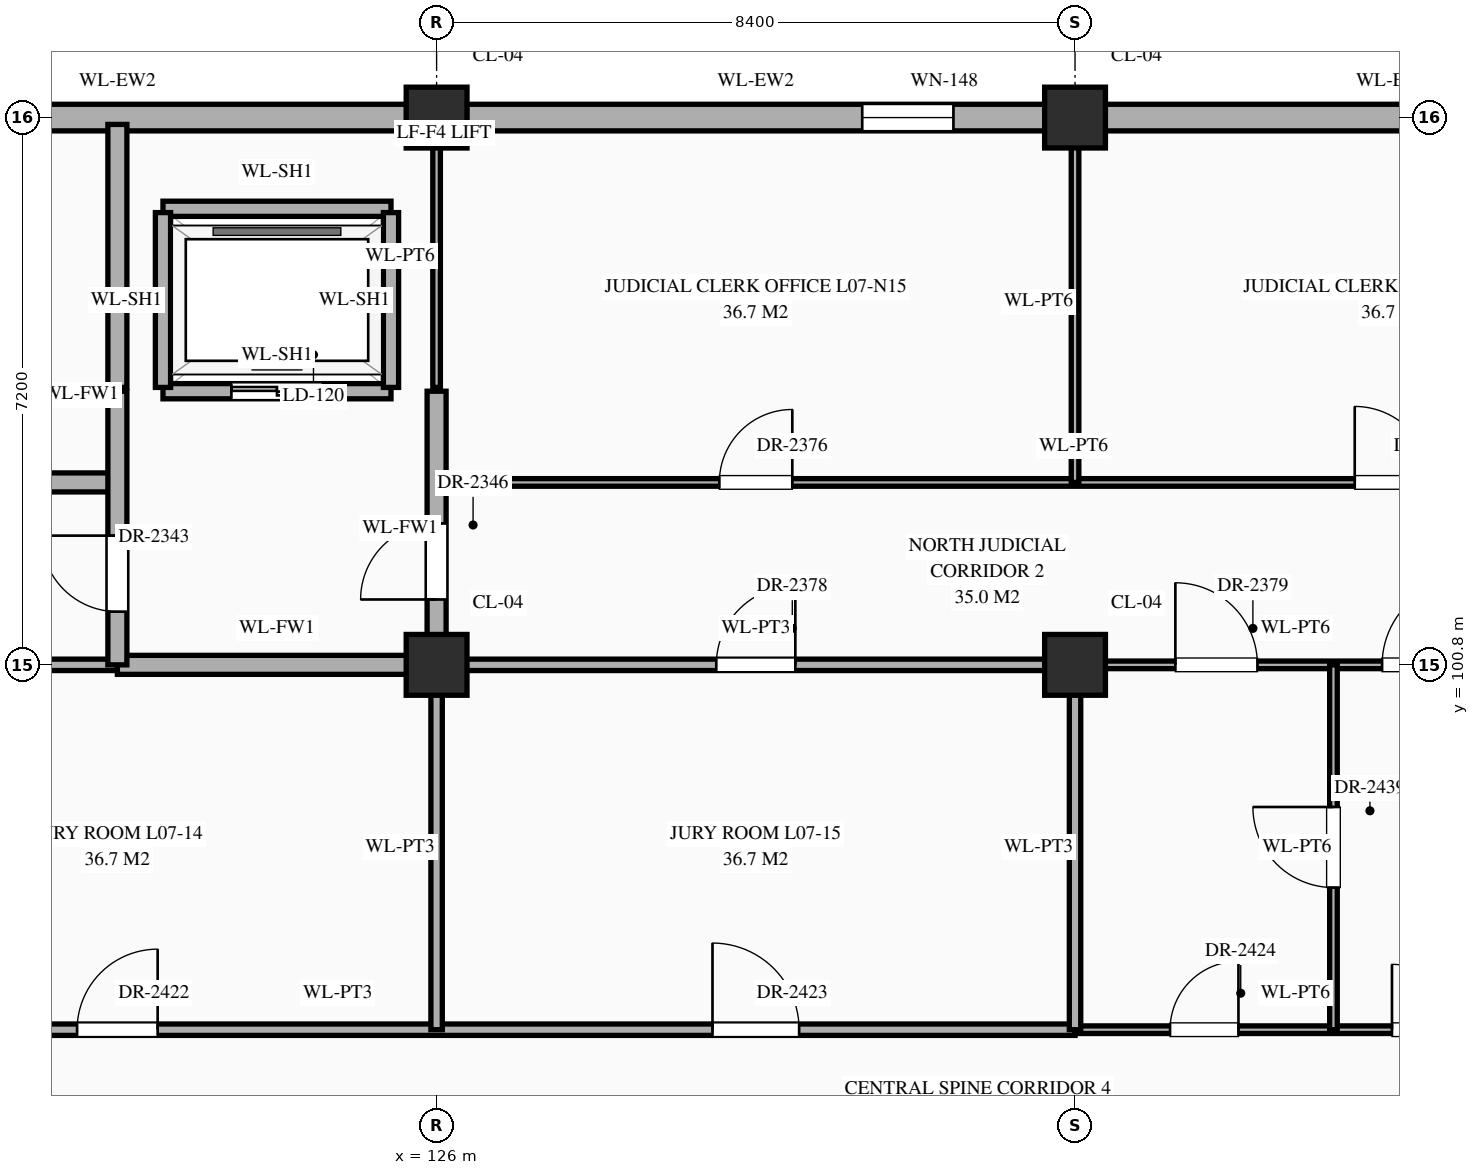
"""IFC4 building model, lengths in metres.
Left out: names, types, materials, properties, quantities, classifications, styles, units other than length and angle.
Written with IfcOpenShell. Run it as: python <this file> out.ifc"""

import sys

from ifc_helpers import new_model, si_unit, direction, frame, frame_2d, origin, origin_2d, place, context, subcontext, project, spatial, rectangle, extrude, element, fill, save


model = new_model("IFC4")
c1 = context("Model", 3, precision=1e-05, world=origin(), true_north=direction((0.0, 1.0)))
c2 = subcontext(c1, "Body", "Model", "MODEL_VIEW")
j1 = project(units=[si_unit("LENGTHUNIT", "METRE"), si_unit("PLANEANGLEUNIT", "RADIAN")], contexts=[c1])
p1 = place(None, origin())
s1 = spatial("IfcSite", under=j1, at=p1, CompositionType="ELEMENT")
p2 = place(p1, origin())
s2 = spatial("IfcBuilding", under=s1, at=p2, CompositionType="ELEMENT")
p3 = place(p2, frame((0.0, 0.0, 30.6)))
s3 = spatial("IfcBuildingStorey", under=s2, at=p3, CompositionType="ELEMENT", Elevation=30.6)
for number, where, z_axis, x_axis in (
    (1, (126.0, 100.8, 0.0), (0.0, 0.0, 1.0), (1.0, 0.0, 0.0)),
    (2, (126.0, 108.0, 0.0), (0.0, 0.0, 1.0), (1.0, 0.0, 0.0)),
    (3, (134.4, 100.8, 0.0), (0.0, 0.0, 1.0), (1.0, 0.0, 0.0)),
    (4, (134.4, 108.0, 0.0), (0.0, 0.0, 1.0), (1.0, 0.0, 0.0)),
):
    element("IfcColumn", number, at=place(p3, frame(where, z_axis=z_axis, x_axis=x_axis)), inside=s3, PredefinedType="COLUMN", context=c2, shape_type="SweptSolid", body=[
        extrude(rectangle(XDim=0.8, YDim=0.8, at=origin_2d()), origin(), (0.0, 0.0, 1.0), 4.5),
    ])
p4 = place(p3, frame((117.995, 108.0, 0.0), z_axis=(0.0, 0.0, 1.0), x_axis=(1.0, 0.0, 0.0)))
e5 = element("IfcWall", 5, at=p4, inside=s3, PredefinedType="STANDARD", context=c2, shape_type="SweptSolid", body=[
    extrude(rectangle(XDim=7.61, YDim=0.35, at=frame_2d((3.805, 0.0))), origin(), (0.0, 0.0, 1.0), 3.59),
])
p5 = place(p3, frame((126.395, 108.0, 0.0), z_axis=(0.0, 0.0, 1.0), x_axis=(1.0, 0.0, 0.0)))
e6 = element("IfcWall", 6, at=p5, inside=s3, PredefinedType="STANDARD", context=c2, shape_type="SweptSolid", body=[
    extrude(rectangle(XDim=7.61, YDim=0.35, at=frame_2d((3.805, 0.0))), origin(), (0.0, 0.0, 1.0), 3.5),
])
p6 = place(p5, frame((5.205, 0.0, 0.85)))
e7 = element("IfcOpeningElement", 7, at=p6, cuts=e6, PredefinedType="OPENING", context=c2, shape_type="SweptSolid", body=[
    extrude(rectangle(XDim=1.2, YDim=1.56, at=frame_2d((0.6, 0.78))), frame((0.0, 0.187, 0.0), z_axis=(0.0, -1.0, 0.0), x_axis=(1.0, 0.0, 0.0)), (0.0, 0.0, 1.0), 0.374),
])
p7 = place(p3, frame((134.795, 108.0, 0.0), z_axis=(0.0, 0.0, 1.0), x_axis=(1.0, 0.0, 0.0)))
e8 = element("IfcWall", 8, at=p7, inside=s3, PredefinedType="STANDARD", context=c2, shape_type="SweptSolid", body=[
    extrude(rectangle(XDim=7.61, YDim=0.35, at=frame_2d((3.805, 0.0))), origin(), (0.0, 0.0, 1.0), 3.65),
])
p8 = place(p7, frame((5.205, 0.0, 0.85)))
e9 = element("IfcOpeningElement", 9, at=p8, cuts=e8, PredefinedType="OPENING", context=c2, shape_type="SweptSolid", body=[
    extrude(rectangle(XDim=1.2, YDim=1.74, at=frame_2d((0.6, 0.87))), frame((0.0, 0.187, 0.0), z_axis=(0.0, -1.0, 0.0), x_axis=(1.0, 0.0, 0.0)), (0.0, 0.0, 1.0), 0.374),
])
p9 = place(p3, frame((115.0, 96.0, 0.0), z_axis=(0.0, 0.0, 1.0), x_axis=(1.0, 0.0, 0.0)))
e10 = element("IfcWall", 10, at=p9, inside=s3, PredefinedType="STANDARD", context=c2, shape_type="SweptSolid", body=[
    extrude(rectangle(XDim=19.4, YDim=0.15, at=frame_2d((9.7, 0.0))), origin(), (0.0, 0.0, 1.0), 4.24),
])
p10 = place(p9, frame((0.72, 0.0, 0.0)))
e11 = element("IfcOpeningElement", 11, at=p10, cuts=e10, PredefinedType="OPENING", context=c2, shape_type="SweptSolid", body=[
    extrude(rectangle(XDim=1.16, YDim=2.3, at=frame_2d((0.58, 1.15))), frame((0.0, 0.087, 0.0), z_axis=(0.0, -1.0, 0.0), x_axis=(1.0, 0.0, 0.0)), (0.0, 0.0, 1.0), 0.174),
])
p11 = place(p9, frame((6.27, 0.0, 0.0)))
e12 = element("IfcOpeningElement", 12, at=p11, cuts=e10, PredefinedType="OPENING", context=c2, shape_type="SweptSolid", body=[
    extrude(rectangle(XDim=1.06, YDim=2.4, at=frame_2d((0.53, 1.2))), frame((0.0, 0.087, 0.0), z_axis=(0.0, -1.0, 0.0), x_axis=(1.0, 0.0, 0.0)), (0.0, 0.0, 1.0), 0.174),
])
p12 = place(p9, frame((14.63, 0.0, 0.0)))
e13 = element("IfcOpeningElement", 13, at=p12, cuts=e10, PredefinedType="OPENING", context=c2, shape_type="SweptSolid", body=[
    extrude(rectangle(XDim=1.14, YDim=2.4, at=frame_2d((0.57, 1.2))), frame((0.0, 0.087, 0.0), z_axis=(0.0, -1.0, 0.0), x_axis=(1.0, 0.0, 0.0)), (0.0, 0.0, 1.0), 0.174),
])
p13 = place(p3, frame((134.4, 96.0, 0.0), z_axis=(0.0, 0.0, 1.0), x_axis=(1.0, 0.0, 0.0)))
e14 = element("IfcWall", 14, at=p13, inside=s3, PredefinedType="STANDARD", context=c2, shape_type="SweptSolid", body=[
    extrude(rectangle(XDim=5.8, YDim=0.1, at=frame_2d((2.9, 0.0))), origin(), (0.0, 0.0, 1.0), 4.3),
])
p14 = place(p13, frame((1.25, 0.0, 0.0)))
e15 = element("IfcOpeningElement", 15, at=p14, cuts=e14, PredefinedType="OPENING", context=c2, shape_type="SweptSolid", body=[
    extrude(rectangle(XDim=0.9, YDim=2.15, at=frame_2d((0.45, 1.075))), frame((0.0, 0.062, 0.0), z_axis=(0.0, -1.0, 0.0), x_axis=(1.0, 0.0, 0.0)), (0.0, 0.0, 1.0), 0.124),
])
p15 = place(p13, frame((4.17, 0.0, 0.0)))
e16 = element("IfcOpeningElement", 16, at=p15, cuts=e14, PredefinedType="OPENING", context=c2, shape_type="SweptSolid", body=[
    extrude(rectangle(XDim=0.86, YDim=2.1, at=frame_2d((0.43, 1.05))), frame((0.0, 0.062, 0.0), z_axis=(0.0, -1.0, 0.0), x_axis=(1.0, 0.0, 0.0)), (0.0, 0.0, 1.0), 0.124),
])
p16 = place(p3, frame((117.6, 100.8, 0.0), z_axis=(0.0, 0.0, 1.0), x_axis=(1.0, 0.0, 0.0)))
e17 = element("IfcWall", 17, at=p16, inside=s3, PredefinedType="STANDARD", context=c2, shape_type="SweptSolid", body=[
    extrude(rectangle(XDim=4.2, YDim=0.15, at=frame_2d((2.1, 0.0))), origin(), (0.0, 0.0, 1.0), 3.39),
])
p17 = place(p16, frame((1.72, 0.0, 0.0)))
e18 = element("IfcOpeningElement", 18, at=p17, cuts=e17, PredefinedType="OPENING", context=c2, shape_type="SweptSolid", body=[
    extrude(rectangle(XDim=1.08, YDim=2.25, at=frame_2d((0.54, 1.125))), frame((0.0, 0.087, 0.0), z_axis=(0.0, -1.0, 0.0), x_axis=(1.0, 0.0, 0.0)), (0.0, 0.0, 1.0), 0.174),
])
p18 = place(p3, frame((121.8, 100.8, 0.0), z_axis=(0.0, 0.0, 1.0), x_axis=(1.0, 0.0, 0.0)))
e19 = element("IfcWall", 19, at=p18, inside=s3, PredefinedType="STANDARD", context=c2, shape_type="SweptSolid", body=[
    extrude(rectangle(XDim=4.2, YDim=0.25, at=frame_2d((2.1, 0.0))), origin(), (0.0, 0.0, 1.0), 3.39),
])
p19 = place(p3, frame((126.0, 100.8, 0.0), z_axis=(0.0, 0.0, 1.0), x_axis=(1.0, 0.0, 0.0)))
e20 = element("IfcWall", 20, at=p19, inside=s3, PredefinedType="STANDARD", context=c2, shape_type="SweptSolid", body=[
    extrude(rectangle(XDim=8.4, YDim=0.15, at=frame_2d((4.2, 0.0))), origin(), (0.0, 0.0, 1.0), 3.3),
])
p20 = place(p19, frame((3.68, 0.0, 0.0)))
e21 = element("IfcOpeningElement", 21, at=p20, cuts=e20, PredefinedType="OPENING", context=c2, shape_type="SweptSolid", body=[
    extrude(rectangle(XDim=1.04, YDim=2.2, at=frame_2d((0.52, 1.1))), frame((0.0, 0.087, 0.0), z_axis=(0.0, -1.0, 0.0), x_axis=(1.0, 0.0, 0.0)), (0.0, 0.0, 1.0), 0.174),
])
p21 = place(p3, frame((134.4, 100.8, 0.0), z_axis=(0.0, 0.0, 1.0), x_axis=(1.0, 0.0, 0.0)))
e22 = element("IfcWall", 22, at=p21, inside=s3, PredefinedType="STANDARD", context=c2, shape_type="SweptSolid", body=[
    extrude(rectangle(XDim=5.8, YDim=0.1, at=frame_2d((2.9, 0.0))), origin(), (0.0, 0.0, 1.0), 3.45),
])
p22 = place(p21, frame((1.32, 0.0, 0.0)))
e23 = element("IfcOpeningElement", 23, at=p22, cuts=e22, PredefinedType="OPENING", context=c2, shape_type="SweptSolid", body=[
    extrude(rectangle(XDim=1.08, YDim=2.25, at=frame_2d((0.54, 1.125))), frame((0.0, 0.062, 0.0), z_axis=(0.0, -1.0, 0.0), x_axis=(1.0, 0.0, 0.0)), (0.0, 0.0, 1.0), 0.124),
])
p23 = place(p21, frame((4.04, 0.0, 0.0)))
e24 = element("IfcOpeningElement", 24, at=p23, cuts=e22, PredefinedType="OPENING", context=c2, shape_type="SweptSolid", body=[
    extrude(rectangle(XDim=1.12, YDim=2.25, at=frame_2d((0.56, 1.125))), frame((0.0, 0.062, 0.0), z_axis=(0.0, -1.0, 0.0), x_axis=(1.0, 0.0, 0.0)), (0.0, 0.0, 1.0), 0.124),
])
p24 = place(p3, frame((117.6, 103.2, 0.0), z_axis=(0.0, 0.0, 1.0), x_axis=(1.0, 0.0, 0.0)))
e25 = element("IfcWall", 25, at=p24, inside=s3, PredefinedType="STANDARD", context=c2, shape_type="SweptSolid", body=[
    extrude(rectangle(XDim=4.2, YDim=0.25, at=frame_2d((2.1, 0.0))), origin(), (0.0, 0.0, 1.0), 4.24),
])
p25 = place(p24, frame((1.55, 0.0, 0.0)))
e26 = element("IfcOpeningElement", 26, at=p25, cuts=e25, PredefinedType="OPENING", context=c2, shape_type="SweptSolid", body=[
    extrude(rectangle(XDim=1.1, YDim=2.2, at=frame_2d((0.55, 1.1))), frame((0.0, 0.137, 0.0), z_axis=(0.0, -1.0, 0.0), x_axis=(1.0, 0.0, 0.0)), (0.0, 0.0, 1.0), 0.274),
])
p26 = place(p3, frame((126.0, 103.2, 0.0), z_axis=(0.0, 0.0, 1.0), x_axis=(1.0, 0.0, 0.0)))
e27 = element("IfcWall", 27, at=p26, inside=s3, PredefinedType="STANDARD", context=c2, shape_type="SweptSolid", body=[
    extrude(rectangle(XDim=16.76, YDim=0.1, at=frame_2d((8.38, 0.0))), origin(), (0.0, 0.0, 1.0), 4.15),
])
p27 = place(p26, frame((3.72, 0.0, 0.0)))
e28 = element("IfcOpeningElement", 28, at=p27, cuts=e27, PredefinedType="OPENING", context=c2, shape_type="SweptSolid", body=[
    extrude(rectangle(XDim=0.96, YDim=2.2, at=frame_2d((0.48, 1.1))), frame((0.0, 0.062, 0.0), z_axis=(0.0, -1.0, 0.0), x_axis=(1.0, 0.0, 0.0)), (0.0, 0.0, 1.0), 0.124),
])
p28 = place(p26, frame((12.08, 0.0, 0.0)))
e29 = element("IfcOpeningElement", 29, at=p28, cuts=e27, PredefinedType="OPENING", context=c2, shape_type="SweptSolid", body=[
    extrude(rectangle(XDim=1.0, YDim=2.25, at=frame_2d((0.5, 1.125))), frame((0.0, 0.062, 0.0), z_axis=(0.0, -1.0, 0.0), x_axis=(1.0, 0.0, 0.0)), (0.0, 0.0, 1.0), 0.124),
])
p29 = place(p3, frame((122.4, 104.4, 0.0), z_axis=(0.0, 0.0, 1.0), x_axis=(1.0, 0.0, 0.0)))
e30 = element("IfcWall", 30, at=p29, inside=s3, PredefinedType="STANDARD", context=c2, shape_type="SweptSolid", body=[
    extrude(rectangle(XDim=3.0, YDim=0.2, at=frame_2d((1.5, 0.0))), origin(), (0.0, 0.0, 1.0), 4.24),
])
p30 = place(p29, frame((0.9, 0.0, 0.0)))
e31 = element("IfcOpeningElement", 31, at=p30, cuts=e30, PredefinedType="OPENING", context=c2, shape_type="SweptSolid", body=[
    extrude(rectangle(XDim=1.2, YDim=2.15, at=frame_2d((0.6, 1.075))), frame((0.0, 0.112, 0.0), z_axis=(0.0, -1.0, 0.0), x_axis=(1.0, 0.0, 0.0)), (0.0, 0.0, 1.0), 0.224),
])
p31 = place(p3, frame((122.4, 106.8, 0.0), z_axis=(0.0, 0.0, 1.0), x_axis=(1.0, 0.0, 0.0)))
e32 = element("IfcWall", 32, at=p31, inside=s3, PredefinedType="STANDARD", context=c2, shape_type="SweptSolid", body=[
    extrude(rectangle(XDim=3.0, YDim=0.2, at=frame_2d((1.5, 0.0))), origin(), (0.0, 0.0, 1.0), 4.24),
])
p32 = place(p3, frame((121.8, 100.8, 0.0), z_axis=(0.0, 0.0, 1.0), x_axis=(0.0, 1.0, 0.0)))
e33 = element("IfcWall", 33, at=p32, inside=s3, PredefinedType="STANDARD", context=c2, shape_type="SweptSolid", body=[
    extrude(rectangle(XDim=3.6, YDim=0.25, at=frame_2d((1.8, 0.0))), origin(), (0.0, 0.0, 1.0), 3.89),
])
p33 = place(p32, frame((0.7, 0.0, 0.0)))
e34 = element("IfcOpeningElement", 34, at=p33, cuts=e33, PredefinedType="OPENING", context=c2, shape_type="SweptSolid", body=[
    extrude(rectangle(XDim=1.0, YDim=2.2, at=frame_2d((0.5, 1.1))), frame((0.0, 0.137, 0.0), z_axis=(0.0, -1.0, 0.0), x_axis=(1.0, 0.0, 0.0)), (0.0, 0.0, 1.0), 0.274),
])
p34 = place(p3, frame((121.8, 104.45, 0.0), z_axis=(0.0, 0.0, 1.0), x_axis=(0.0, 1.0, 0.0)))
e35 = element("IfcWall", 35, at=p34, inside=s3, PredefinedType="STANDARD", context=c2, shape_type="SweptSolid", body=[
    extrude(rectangle(XDim=3.46, YDim=0.25, at=frame_2d((1.73, 0.0))), origin(), (0.0, 0.0, 1.0), 3.89),
])
for number, where, z_axis, x_axis in (
    (36, (122.4, 104.45, 0.0), (0.0, 0.0, 1.0), (0.0, 1.0, 0.0)),
    (37, (125.4, 104.45, 0.0), (0.0, 0.0, 1.0), (0.0, 1.0, 0.0)),
):
    element("IfcWall", number, at=place(p3, frame(where, z_axis=z_axis, x_axis=x_axis)), inside=s3, PredefinedType="STANDARD", context=c2, shape_type="SweptSolid", body=[
        extrude(rectangle(XDim=2.3, YDim=0.2, at=frame_2d((1.15, 0.0))), origin(), (0.0, 0.0, 1.0), 4.24),
    ])
p35 = place(p3, frame((126.0, 96.0, 0.0), z_axis=(0.0, 0.0, 1.0), x_axis=(0.0, 1.0, 0.0)))
e38 = element("IfcWall", 38, at=p35, inside=s3, PredefinedType="STANDARD", context=c2, shape_type="SweptSolid", body=[
    extrude(rectangle(XDim=4.8, YDim=0.15, at=frame_2d((2.4, 0.0))), origin(), (0.0, 0.0, 1.0), 3.4),
])
p36 = place(p3, frame((126.0, 100.8, 0.0), z_axis=(0.0, 0.0, 1.0), x_axis=(0.0, 1.0, 0.0)))
e39 = element("IfcWall", 39, at=p36, inside=s3, PredefinedType="STANDARD", context=c2, shape_type="SweptSolid", body=[
    extrude(rectangle(XDim=3.6, YDim=0.25, at=frame_2d((1.8, 0.0))), origin(), (0.0, 0.0, 1.0), 3.4),
])
p37 = place(p36, frame((0.86, 0.0, 0.0)))
e40 = element("IfcOpeningElement", 40, at=p37, cuts=e39, PredefinedType="OPENING", context=c2, shape_type="SweptSolid", body=[
    extrude(rectangle(XDim=1.0, YDim=2.2, at=frame_2d((0.5, 1.1))), frame((0.0, 0.137, 0.0), z_axis=(0.0, -1.0, 0.0), x_axis=(1.0, 0.0, 0.0)), (0.0, 0.0, 1.0), 0.274),
])
p38 = place(p3, frame((126.0, 104.45, 0.0), z_axis=(0.0, 0.0, 1.0), x_axis=(0.0, 1.0, 0.0)))
e41 = element("IfcWall", 41, at=p38, inside=s3, PredefinedType="STANDARD", context=c2, shape_type="SweptSolid", body=[
    extrude(rectangle(XDim=3.46, YDim=0.1, at=frame_2d((1.73, 0.0))), origin(), (0.0, 0.0, 1.0), 3.4),
])
p39 = place(p3, frame((134.4, 96.0, 0.0), z_axis=(0.0, 0.0, 1.0), x_axis=(0.0, 1.0, 0.0)))
e42 = element("IfcWall", 42, at=p39, inside=s3, PredefinedType="STANDARD", context=c2, shape_type="SweptSolid", body=[
    extrude(rectangle(XDim=4.8, YDim=0.15, at=frame_2d((2.4, 0.0))), origin(), (0.0, 0.0, 1.0), 4.15),
])
p40 = place(p3, frame((134.4, 103.2, 0.0), z_axis=(0.0, 0.0, 1.0), x_axis=(0.0, 1.0, 0.0)))
e43 = element("IfcWall", 43, at=p40, inside=s3, PredefinedType="STANDARD", context=c2, shape_type="SweptSolid", body=[
    extrude(rectangle(XDim=4.76, YDim=0.1, at=frame_2d((2.38, 0.0))), origin(), (0.0, 0.0, 1.0), 3.4),
])
p41 = place(p3, frame((137.8, 96.0, 0.0), z_axis=(0.0, 0.0, 1.0), x_axis=(0.0, 1.0, 0.0)))
e44 = element("IfcWall", 44, at=p41, inside=s3, PredefinedType="STANDARD", context=c2, shape_type="SweptSolid", body=[
    extrude(rectangle(XDim=4.8, YDim=0.1, at=frame_2d((2.4, 0.0))), origin(), (0.0, 0.0, 1.0), 4.3),
])
p42 = place(p41, frame((1.87, 0.0, 0.0)))
e45 = element("IfcOpeningElement", 45, at=p42, cuts=e44, PredefinedType="OPENING", context=c2, shape_type="SweptSolid", body=[
    extrude(rectangle(XDim=1.06, YDim=2.4, at=frame_2d((0.53, 1.2))), frame((0.0, 0.062, 0.0), z_axis=(0.0, -1.0, 0.0), x_axis=(1.0, 0.0, 0.0)), (0.0, 0.0, 1.0), 0.124),
])
p43 = place(p6, origin())
e46 = element("IfcWindow", 46, at=p43, inside=s3, PartitioningType="SINGLE_PANEL", PredefinedType="WINDOW", context=c2, shape_type="SweptSolid", body=[
    extrude(rectangle(XDim=1.2, YDim=1.56, at=frame_2d((0.6, 0.78))), frame((0.0, 0.03, 0.0), z_axis=(0.0, -1.0, 0.0), x_axis=(1.0, 0.0, 0.0)), (0.0, 0.0, 1.0), 0.06),
])
fill(e7, e46)
p44 = place(p30, origin())
e47 = element("IfcDoor", 47, at=p44, inside=s3, OperationType="DOUBLE_DOOR_SLIDING", PredefinedType="DOOR", context=c2, shape_type="SweptSolid", body=[
    extrude(rectangle(XDim=1.2, YDim=2.15, at=frame_2d((0.6, 1.075))), frame((0.0, 0.025, 0.0), z_axis=(0.0, -1.0, 0.0), x_axis=(1.0, 0.0, 0.0)), (0.0, 0.0, 1.0), 0.05),
])
fill(e31, e47)
p45 = place(p33, origin())
e48 = element("IfcDoor", 48, at=p45, inside=s3, OperationType="SINGLE_SWING_RIGHT", PredefinedType="DOOR", context=c2, shape_type="SweptSolid", body=[
    extrude(rectangle(XDim=1.0, YDim=2.2, at=frame_2d((0.5, 1.1))), frame((0.0, 0.025, 0.0), z_axis=(0.0, -1.0, 0.0), x_axis=(1.0, 0.0, 0.0)), (0.0, 0.0, 1.0), 0.05),
])
fill(e34, e48)
p46 = place(p37, origin())
e49 = element("IfcDoor", 49, at=p46, inside=s3, OperationType="SINGLE_SWING_LEFT", PredefinedType="DOOR", context=c2, shape_type="SweptSolid", body=[
    extrude(rectangle(XDim=1.0, YDim=2.2, at=frame_2d((0.5, 1.1))), frame((0.0, 0.025, 0.0), z_axis=(0.0, -1.0, 0.0), x_axis=(1.0, 0.0, 0.0)), (0.0, 0.0, 1.0), 0.05),
])
fill(e40, e49)
p47 = place(p27, origin())
e50 = element("IfcDoor", 50, at=p47, inside=s3, OperationType="SINGLE_SWING_RIGHT", PredefinedType="DOOR", context=c2, shape_type="SweptSolid", body=[
    extrude(rectangle(XDim=0.96, YDim=2.2, at=frame_2d((0.48, 1.1))), frame((0.0, 0.025, 0.0), z_axis=(0.0, -1.0, 0.0), x_axis=(1.0, 0.0, 0.0)), (0.0, 0.0, 1.0), 0.05),
])
fill(e28, e50)
p48 = place(p28, origin())
e51 = element("IfcDoor", 51, at=p48, inside=s3, OperationType="SINGLE_SWING_LEFT", PredefinedType="DOOR", context=c2, shape_type="SweptSolid", body=[
    extrude(rectangle(XDim=1.0, YDim=2.25, at=frame_2d((0.5, 1.125))), frame((0.0, 0.025, 0.0), z_axis=(0.0, -1.0, 0.0), x_axis=(1.0, 0.0, 0.0)), (0.0, 0.0, 1.0), 0.05),
])
fill(e29, e51)
p49 = place(p20, origin())
e52 = element("IfcDoor", 52, at=p49, inside=s3, OperationType="SINGLE_SWING_RIGHT", PredefinedType="DOOR", context=c2, shape_type="SweptSolid", body=[
    extrude(rectangle(XDim=1.04, YDim=2.2, at=frame_2d((0.52, 1.1))), frame((0.0, 0.025, 0.0), z_axis=(0.0, -1.0, 0.0), x_axis=(1.0, 0.0, 0.0)), (0.0, 0.0, 1.0), 0.05),
])
fill(e21, e52)
p50 = place(p22, origin())
e53 = element("IfcDoor", 53, at=p50, inside=s3, OperationType="SINGLE_SWING_LEFT", PredefinedType="DOOR", context=c2, shape_type="SweptSolid", body=[
    extrude(rectangle(XDim=1.08, YDim=2.25, at=frame_2d((0.54, 1.125))), frame((0.0, 0.025, 0.0), z_axis=(0.0, -1.0, 0.0), x_axis=(1.0, 0.0, 0.0)), (0.0, 0.0, 1.0), 0.05),
])
fill(e23, e53)
p51 = place(p23, origin())
e54 = element("IfcDoor", 54, at=p51, inside=s3, OperationType="SINGLE_SWING_RIGHT", PredefinedType="DOOR", context=c2, shape_type="SweptSolid", body=[
    extrude(rectangle(XDim=1.12, YDim=2.25, at=frame_2d((0.56, 1.125))), frame((0.0, 0.025, 0.0), z_axis=(0.0, -1.0, 0.0), x_axis=(1.0, 0.0, 0.0)), (0.0, 0.0, 1.0), 0.05),
])
fill(e24, e54)
p52 = place(p11, origin())
e55 = element("IfcDoor", 55, at=p52, inside=s3, OperationType="SINGLE_SWING_RIGHT", PredefinedType="DOOR", context=c2, shape_type="SweptSolid", body=[
    extrude(rectangle(XDim=1.06, YDim=2.4, at=frame_2d((0.53, 1.2))), frame((0.0, 0.025, 0.0), z_axis=(0.0, -1.0, 0.0), x_axis=(1.0, 0.0, 0.0)), (0.0, 0.0, 1.0), 0.05),
])
fill(e12, e55)
p53 = place(p12, origin())
e56 = element("IfcDoor", 56, at=p53, inside=s3, OperationType="SINGLE_SWING_LEFT", PredefinedType="DOOR", context=c2, shape_type="SweptSolid", body=[
    extrude(rectangle(XDim=1.14, YDim=2.4, at=frame_2d((0.57, 1.2))), frame((0.0, 0.025, 0.0), z_axis=(0.0, -1.0, 0.0), x_axis=(1.0, 0.0, 0.0)), (0.0, 0.0, 1.0), 0.05),
])
fill(e13, e56)
p54 = place(p14, origin())
e57 = element("IfcDoor", 57, at=p54, inside=s3, OperationType="SINGLE_SWING_RIGHT", PredefinedType="DOOR", context=c2, shape_type="SweptSolid", body=[
    extrude(rectangle(XDim=0.9, YDim=2.15, at=frame_2d((0.45, 1.075))), frame((0.0, 0.025, 0.0), z_axis=(0.0, -1.0, 0.0), x_axis=(1.0, 0.0, 0.0)), (0.0, 0.0, 1.0), 0.05),
])
fill(e15, e57)
p55 = place(p15, origin())
e58 = element("IfcDoor", 58, at=p55, inside=s3, OperationType="SINGLE_SWING_LEFT", PredefinedType="DOOR", context=c2, shape_type="SweptSolid", body=[
    extrude(rectangle(XDim=0.86, YDim=2.1, at=frame_2d((0.43, 1.05))), frame((0.0, 0.025, 0.0), z_axis=(0.0, -1.0, 0.0), x_axis=(1.0, 0.0, 0.0)), (0.0, 0.0, 1.0), 0.05),
])
fill(e16, e58)
p56 = place(p42, origin())
e59 = element("IfcDoor", 59, at=p56, inside=s3, OperationType="SINGLE_SWING_RIGHT", PredefinedType="DOOR", context=c2, shape_type="SweptSolid", body=[
    extrude(rectangle(XDim=1.06, YDim=2.4, at=frame_2d((0.53, 1.2))), frame((0.0, 0.025, 0.0), z_axis=(0.0, -1.0, 0.0), x_axis=(1.0, 0.0, 0.0)), (0.0, 0.0, 1.0), 0.05),
])
fill(e45, e59)
save(model, sys.argv[1])
